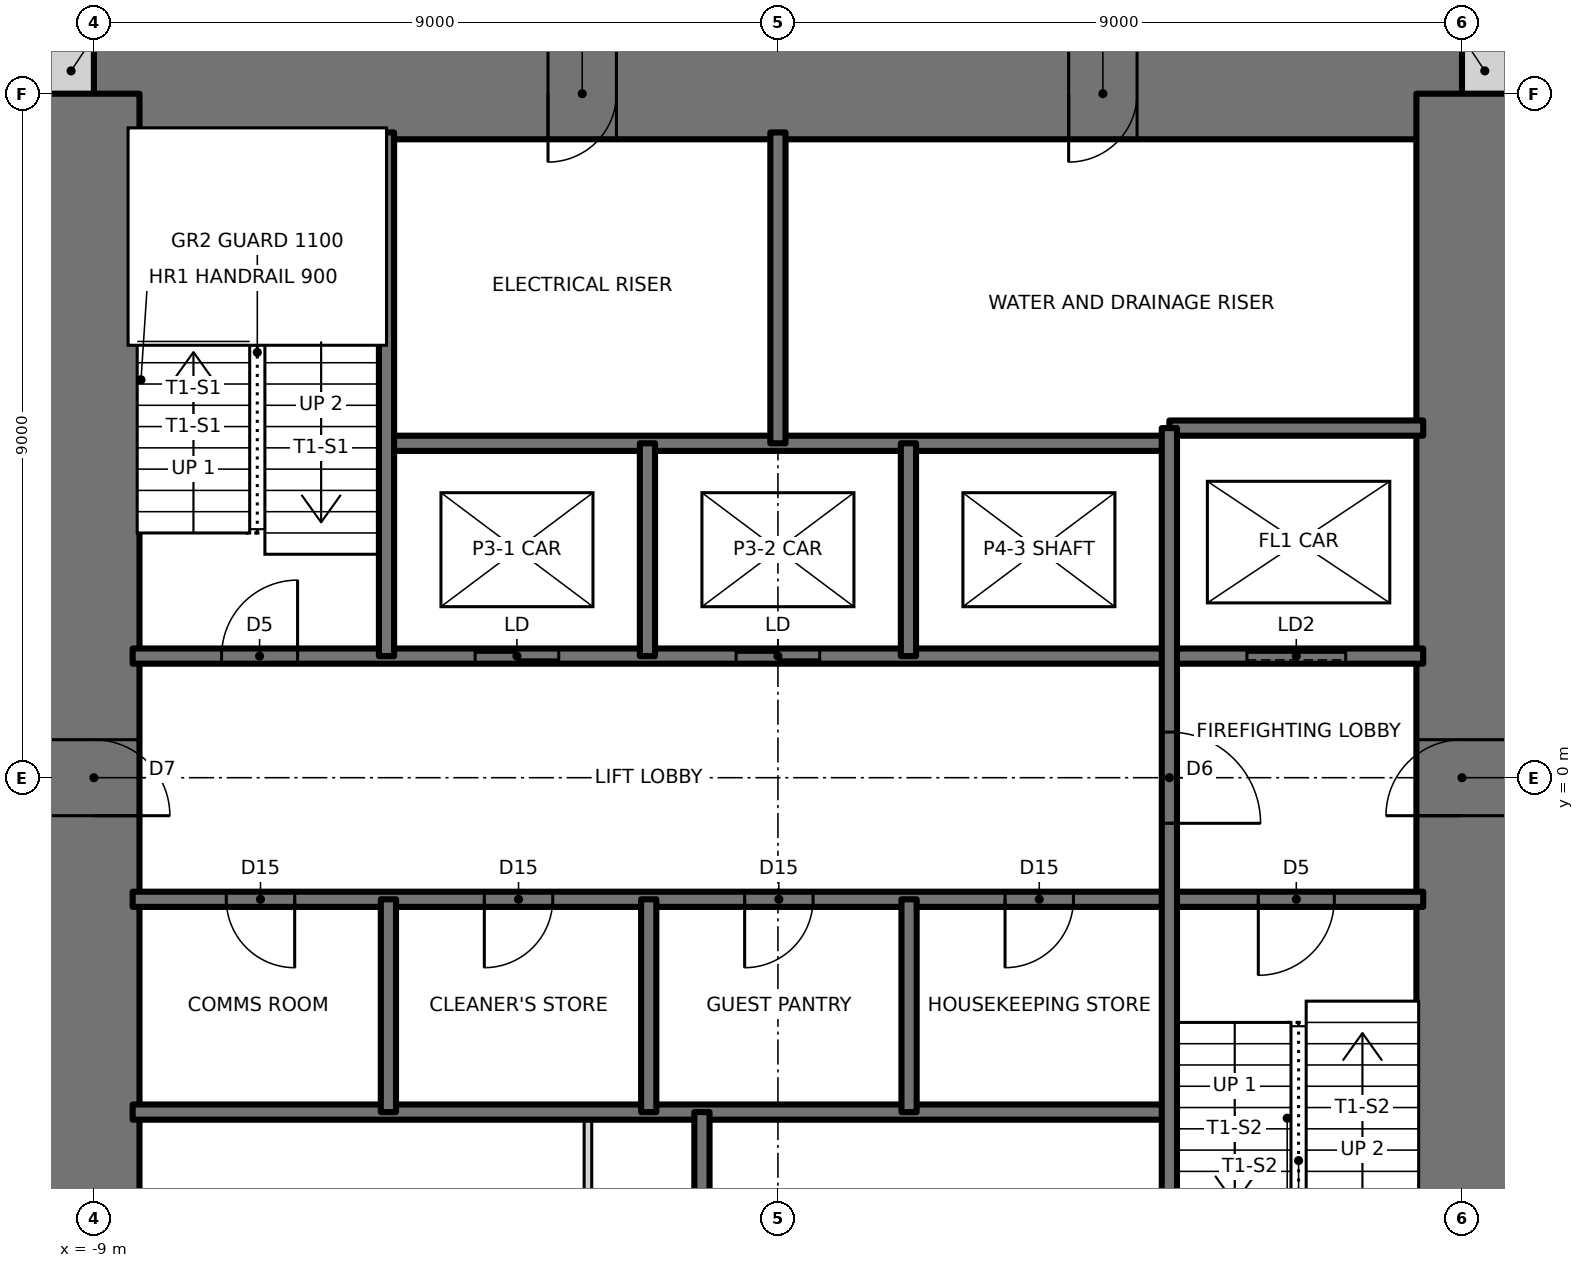
"""IFC4 building model, lengths in metres.
Left out: names, types, materials, properties, quantities, classifications, styles, units other than length and angle.
Written with IfcOpenShell. Run it as: python <this file> out.ifc"""

import sys

from ifc_helpers import new_model, si_unit, direction, frame, frame_2d, origin, place, context, subcontext, project, spatial, rectangle, extrude, element, fill, save


model = new_model("IFC4")
c1 = context("Model", 3, precision=1e-05, world=origin(), true_north=direction((0.0, 1.0)))
c2 = subcontext(c1, "Body", "Model", "MODEL_VIEW")
j1 = project(units=[si_unit("LENGTHUNIT", "METRE"), si_unit("PLANEANGLEUNIT", "RADIAN")], contexts=[c1])
p1 = place(None, origin())
s1 = spatial("IfcSite", under=j1, at=p1, CompositionType="ELEMENT")
p2 = place(p1, origin())
s2 = spatial("IfcBuilding", under=s1, at=p2, CompositionType="ELEMENT")
p3 = place(p2, frame((0.0, 0.0, 198.5)))
s3 = spatial("IfcBuildingStorey", under=s2, at=p3, CompositionType="ELEMENT", Elevation=198.5)
for number, where, z_axis, x_axis in (
    (1, (9.0, 9.3, 0.0), (0.0, 0.0, 1.0), (1.0, 0.0, 0.0)),
    (2, (-9.6, 9.3, 0.0), (0.0, 0.0, 1.0), (1.0, 0.0, 0.0)),
):
    element("IfcWall", number, at=place(p3, frame(where, z_axis=z_axis, x_axis=x_axis)), inside=s3, PredefinedType="SOLIDWALL", context=c2, shape_type="SweptSolid", body=[
        extrude(rectangle(XDim=0.6, YDim=0.6, at=frame_2d((0.3, 0.0))), origin(), (0.0, 0.0, 1.0), 3.5),
    ])
p4 = place(p3, frame((9.0, 9.0, 0.0), z_axis=(0.0, 0.0, 1.0), x_axis=(-1.0, 0.0, 0.0)))
e3 = element("IfcWall", 3, at=p4, inside=s3, PredefinedType="SHEAR", context=c2, shape_type="SweptSolid", body=[
    extrude(rectangle(XDim=18.0, YDim=1.2, at=frame_2d((9.0, 0.0))), origin(), (0.0, 0.0, 1.0), 3.5),
])
p5 = place(p4, frame((11.125, 0.0, 0.0)))
e4 = element("IfcOpeningElement", 4, at=p5, cuts=e3, PredefinedType="OPENING", context=c2, shape_type="SweptSolid", body=[
    extrude(rectangle(XDim=0.9, YDim=2.1, at=frame_2d((0.45, 1.05))), frame((0.0, 0.61, 0.0), z_axis=(0.0, -1.0, 0.0), x_axis=(1.0, 0.0, 0.0)), (0.0, 0.0, 1.0), 1.22),
])
p6 = place(p4, frame((4.275, 0.0, 0.0)))
e5 = element("IfcOpeningElement", 5, at=p6, cuts=e3, PredefinedType="OPENING", context=c2, shape_type="SweptSolid", body=[
    extrude(rectangle(XDim=0.9, YDim=2.1, at=frame_2d((0.45, 1.05))), frame((0.0, 0.61, 0.0), z_axis=(0.0, -1.0, 0.0), x_axis=(1.0, 0.0, 0.0)), (0.0, 0.0, 1.0), 1.22),
])
p7 = place(p3, frame((9.0, -9.0, 0.0), z_axis=(0.0, 0.0, 1.0), x_axis=(0.0, 1.0, 0.0)))
e6 = element("IfcWall", 6, at=p7, inside=s3, PredefinedType="SHEAR", context=c2, shape_type="SweptSolid", body=[
    extrude(rectangle(XDim=18.0, YDim=1.2, at=frame_2d((9.0, 0.0))), origin(), (0.0, 0.0, 1.0), 3.5),
])
p8 = place(p7, frame((8.5, 0.0, 0.0)))
e7 = element("IfcOpeningElement", 7, at=p8, cuts=e6, PredefinedType="OPENING", context=c2, shape_type="SweptSolid", body=[
    extrude(rectangle(XDim=1.0, YDim=2.1, at=frame_2d((0.5, 1.05))), frame((0.0, 0.61, 0.0), z_axis=(0.0, -1.0, 0.0), x_axis=(1.0, 0.0, 0.0)), (0.0, 0.0, 1.0), 1.22),
])
p9 = place(p3, frame((-9.0, 9.0, 0.0), z_axis=(0.0, 0.0, 1.0), x_axis=(0.0, -1.0, 0.0)))
e8 = element("IfcWall", 8, at=p9, inside=s3, PredefinedType="SHEAR", context=c2, shape_type="SweptSolid", body=[
    extrude(rectangle(XDim=18.0, YDim=1.2, at=frame_2d((9.0, 0.0))), origin(), (0.0, 0.0, 1.0), 3.5),
])
p10 = place(p9, frame((8.5, 0.0, 0.0)))
e9 = element("IfcOpeningElement", 9, at=p10, cuts=e8, PredefinedType="OPENING", context=c2, shape_type="SweptSolid", body=[
    extrude(rectangle(XDim=1.0, YDim=2.1, at=frame_2d((0.5, 1.05))), frame((0.0, 0.61, 0.0), z_axis=(0.0, -1.0, 0.0), x_axis=(1.0, 0.0, 0.0)), (0.0, 0.0, 1.0), 1.22),
])
p11 = place(p3, frame((-8.49, -4.4, 0.0), z_axis=(0.0, 0.0, 1.0), x_axis=(1.0, 0.0, 0.0)))
e10 = element("IfcWall", 10, at=p11, inside=s3, PredefinedType="SOLIDWALL", context=c2, shape_type="SweptSolid", body=[
    extrude(rectangle(XDim=13.64, YDim=0.2, at=frame_2d((6.82, 0.0))), origin(), (0.0, 0.0, 1.0), 3.5),
])
p12 = place(p3, frame((-8.49, -1.6, 0.0), z_axis=(0.0, 0.0, 1.0), x_axis=(1.0, 0.0, 0.0)))
e11 = element("IfcWall", 11, at=p12, inside=s3, PredefinedType="SOLIDWALL", context=c2, shape_type="SweptSolid", body=[
    extrude(rectangle(XDim=16.98, YDim=0.2, at=frame_2d((8.49, 0.0))), origin(), (0.0, 0.0, 1.0), 3.5),
])
p13 = place(p12, frame((14.81, 0.0, 0.0)))
e12 = element("IfcOpeningElement", 12, at=p13, cuts=e11, PredefinedType="OPENING", context=c2, shape_type="SweptSolid", body=[
    extrude(rectangle(XDim=1.0, YDim=2.1, at=frame_2d((0.5, 1.05))), frame((0.0, 0.11, 0.0), z_axis=(0.0, -1.0, 0.0), x_axis=(1.0, 0.0, 0.0)), (0.0, 0.0, 1.0), 0.22),
])
p14 = place(p12, frame((1.232, 0.0, 0.0)))
e13 = element("IfcOpeningElement", 13, at=p14, cuts=e11, PredefinedType="OPENING", context=c2, shape_type="SweptSolid", body=[
    extrude(rectangle(XDim=0.9, YDim=2.1, at=frame_2d((0.45, 1.05))), frame((0.0, 0.11, 0.0), z_axis=(0.0, -1.0, 0.0), x_axis=(1.0, 0.0, 0.0)), (0.0, 0.0, 1.0), 0.22),
])
p15 = place(p12, frame((4.627, 0.0, 0.0)))
e14 = element("IfcOpeningElement", 14, at=p15, cuts=e11, PredefinedType="OPENING", context=c2, shape_type="SweptSolid", body=[
    extrude(rectangle(XDim=0.9, YDim=2.1, at=frame_2d((0.45, 1.05))), frame((0.0, 0.11, 0.0), z_axis=(0.0, -1.0, 0.0), x_axis=(1.0, 0.0, 0.0)), (0.0, 0.0, 1.0), 0.22),
])
p16 = place(p12, frame((8.052, 0.0, 0.0)))
e15 = element("IfcOpeningElement", 15, at=p16, cuts=e11, PredefinedType="OPENING", context=c2, shape_type="SweptSolid", body=[
    extrude(rectangle(XDim=0.9, YDim=2.1, at=frame_2d((0.45, 1.05))), frame((0.0, 0.11, 0.0), z_axis=(0.0, -1.0, 0.0), x_axis=(1.0, 0.0, 0.0)), (0.0, 0.0, 1.0), 0.22),
])
p17 = place(p12, frame((11.478, 0.0, 0.0)))
e16 = element("IfcOpeningElement", 16, at=p17, cuts=e11, PredefinedType="OPENING", context=c2, shape_type="SweptSolid", body=[
    extrude(rectangle(XDim=0.9, YDim=2.1, at=frame_2d((0.45, 1.05))), frame((0.0, 0.11, 0.0), z_axis=(0.0, -1.0, 0.0), x_axis=(1.0, 0.0, 0.0)), (0.0, 0.0, 1.0), 0.22),
])
p18 = place(p3, frame((-8.49, 1.6, 0.0), z_axis=(0.0, 0.0, 1.0), x_axis=(1.0, 0.0, 0.0)))
e17 = element("IfcWall", 17, at=p18, inside=s3, PredefinedType="SOLIDWALL", context=c2, shape_type="SweptSolid", body=[
    extrude(rectangle(XDim=16.98, YDim=0.2, at=frame_2d((8.49, 0.0))), origin(), (0.0, 0.0, 1.0), 3.5),
])
p19 = place(p18, frame((1.17, 0.0, 0.0)))
e18 = element("IfcOpeningElement", 18, at=p19, cuts=e17, PredefinedType="OPENING", context=c2, shape_type="SweptSolid", body=[
    extrude(rectangle(XDim=1.0, YDim=2.1, at=frame_2d((0.5, 1.05))), frame((0.0, 0.11, 0.0), z_axis=(0.0, -1.0, 0.0), x_axis=(1.0, 0.0, 0.0)), (0.0, 0.0, 1.0), 0.22),
])
p20 = place(p18, frame((4.506, 0.0, 0.0)))
e19 = element("IfcOpeningElement", 19, at=p20, cuts=e17, PredefinedType="OPENING", context=c2, shape_type="SweptSolid", body=[
    extrude(rectangle(XDim=1.1, YDim=2.1, at=frame_2d((0.55, 1.05))), frame((0.0, 0.11, 0.0), z_axis=(0.0, -1.0, 0.0), x_axis=(1.0, 0.0, 0.0)), (0.0, 0.0, 1.0), 0.22),
])
p21 = place(p18, frame((7.94, 0.0, 0.0)))
e20 = element("IfcOpeningElement", 20, at=p21, cuts=e17, PredefinedType="OPENING", context=c2, shape_type="SweptSolid", body=[
    extrude(rectangle(XDim=1.1, YDim=2.1, at=frame_2d((0.55, 1.05))), frame((0.0, 0.11, 0.0), z_axis=(0.0, -1.0, 0.0), x_axis=(1.0, 0.0, 0.0)), (0.0, 0.0, 1.0), 0.22),
])
p22 = place(p18, frame((14.66, 0.0, 0.0)))
e21 = element("IfcOpeningElement", 21, at=p22, cuts=e17, PredefinedType="OPENING", context=c2, shape_type="SweptSolid", body=[
    extrude(rectangle(XDim=1.3, YDim=2.1, at=frame_2d((0.65, 1.05))), frame((0.0, 0.11, 0.0), z_axis=(0.0, -1.0, 0.0), x_axis=(1.0, 0.0, 0.0)), (0.0, 0.0, 1.0), 0.22),
])
p23 = place(p3, frame((-5.15, 4.4, 0.0), z_axis=(0.0, 0.0, 1.0), x_axis=(1.0, 0.0, 0.0)))
e22 = element("IfcWall", 22, at=p23, inside=s3, PredefinedType="SOLIDWALL", context=c2, shape_type="SweptSolid", body=[
    extrude(rectangle(XDim=10.3, YDim=0.2, at=frame_2d((5.15, 0.0))), origin(), (0.0, 0.0, 1.0), 3.5),
])
p24 = place(p3, frame((5.15, 4.6, 0.0), z_axis=(0.0, 0.0, 1.0), x_axis=(1.0, 0.0, 0.0)))
e23 = element("IfcWall", 23, at=p24, inside=s3, PredefinedType="SOLIDWALL", context=c2, shape_type="SweptSolid", body=[
    extrude(rectangle(XDim=3.34, YDim=0.2, at=frame_2d((1.67, 0.0))), origin(), (0.0, 0.0, 1.0), 3.5),
])
p25 = place(p3, frame((5.15, -8.49, 0.0), z_axis=(0.0, 0.0, 1.0), x_axis=(0.0, 1.0, 0.0)))
e24 = element("IfcWall", 24, at=p25, inside=s3, PredefinedType="SOLIDWALL", context=c2, shape_type="SweptSolid", body=[
    extrude(rectangle(XDim=13.09, YDim=0.2, at=frame_2d((6.545, 0.0))), origin(), (0.0, 0.0, 1.0), 3.5),
])
p26 = place(p25, frame((7.89, 0.0, 0.0)))
e25 = element("IfcOpeningElement", 25, at=p26, cuts=e24, PredefinedType="OPENING", context=c2, shape_type="SweptSolid", body=[
    extrude(rectangle(XDim=1.2, YDim=2.1, at=frame_2d((0.6, 1.05))), frame((0.0, 0.11, 0.0), z_axis=(0.0, -1.0, 0.0), x_axis=(1.0, 0.0, 0.0)), (0.0, 0.0, 1.0), 0.22),
])
for number, where, z_axis, x_axis in (
    (26, (1.725, -4.4, 0.0), (0.0, 0.0, 1.0), (0.0, 1.0, 0.0)),
    (27, (1.717, 1.6, 0.0), (0.0, 0.0, 1.0), (0.0, 1.0, 0.0)),
):
    element("IfcWall", number, at=place(p3, frame(where, z_axis=z_axis, x_axis=x_axis)), inside=s3, PredefinedType="SOLIDWALL", context=c2, shape_type="SweptSolid", body=[
        extrude(rectangle(XDim=2.8, YDim=0.2, at=frame_2d((1.4, 0.0))), origin(), (0.0, 0.0, 1.0), 3.5),
    ])
for number, where, z_axis, x_axis in (
    (28, (0.0, 4.4, 0.0), (0.0, 0.0, 1.0), (0.0, 1.0, 0.0)),
    (29, (-1.0, -8.49, 0.0), (0.0, 0.0, 1.0), (0.0, 1.0, 0.0)),
):
    element("IfcWall", number, at=place(p3, frame(where, z_axis=z_axis, x_axis=x_axis)), inside=s3, PredefinedType="SOLIDWALL", context=c2, shape_type="SweptSolid", body=[
        extrude(rectangle(XDim=4.09, YDim=0.2, at=frame_2d((2.045, 0.0))), origin(), (0.0, 0.0, 1.0), 3.5),
    ])
for number, where, z_axis, x_axis in (
    (30, (-1.7, -4.4, 0.0), (0.0, 0.0, 1.0), (0.0, 1.0, 0.0)),
    (31, (-1.717, 1.6, 0.0), (0.0, 0.0, 1.0), (0.0, 1.0, 0.0)),
):
    element("IfcWall", number, at=place(p3, frame(where, z_axis=z_axis, x_axis=x_axis)), inside=s3, PredefinedType="SOLIDWALL", context=c2, shape_type="SweptSolid", body=[
        extrude(rectangle(XDim=2.8, YDim=0.2, at=frame_2d((1.4, 0.0))), origin(), (0.0, 0.0, 1.0), 3.5),
    ])
p27 = place(p3, frame((-2.5, -8.49, 0.0), z_axis=(0.0, 0.0, 1.0), x_axis=(0.0, 1.0, 0.0)))
e32 = element("IfcWall", 32, at=p27, inside=s3, PredefinedType="PARTITIONING", context=c2, shape_type="SweptSolid", body=[
    extrude(rectangle(XDim=4.09, YDim=0.1, at=frame_2d((2.045, 0.0))), origin(), (0.0, 0.0, 1.0), 3.3),
])
p28 = place(p27, frame((1.595, 0.0, 0.0)))
e33 = element("IfcOpeningElement", 33, at=p28, cuts=e32, PredefinedType="OPENING", context=c2, shape_type="SweptSolid", body=[
    extrude(rectangle(XDim=0.9, YDim=2.1, at=frame_2d((0.45, 1.05))), frame((0.0, 0.06, 0.0), z_axis=(0.0, -1.0, 0.0), x_axis=(1.0, 0.0, 0.0)), (0.0, 0.0, 1.0), 0.12),
])
p29 = place(p3, frame((-5.125, -4.4, 0.0), z_axis=(0.0, 0.0, 1.0), x_axis=(0.0, 1.0, 0.0)))
e34 = element("IfcWall", 34, at=p29, inside=s3, PredefinedType="SOLIDWALL", context=c2, shape_type="SweptSolid", body=[
    extrude(rectangle(XDim=2.8, YDim=0.2, at=frame_2d((1.4, 0.0))), origin(), (0.0, 0.0, 1.0), 3.5),
])
p30 = place(p3, frame((-5.15, 1.6, 0.0), z_axis=(0.0, 0.0, 1.0), x_axis=(0.0, 1.0, 0.0)))
e35 = element("IfcWall", 35, at=p30, inside=s3, PredefinedType="SOLIDWALL", context=c2, shape_type="SweptSolid", body=[
    extrude(rectangle(XDim=6.89, YDim=0.2, at=frame_2d((3.445, 0.0))), origin(), (0.0, 0.0, 1.0), 3.5),
])
p31 = place(p19, origin())
e36 = element("IfcDoor", 36, at=p31, inside=s3, OperationType="SINGLE_SWING_RIGHT", PredefinedType="DOOR", context=c2, shape_type="SweptSolid", body=[
    extrude(rectangle(XDim=1.0, YDim=2.1, at=frame_2d((0.5, 1.05))), frame((0.0, 0.025, 0.0), z_axis=(0.0, -1.0, 0.0), x_axis=(1.0, 0.0, 0.0)), (0.0, 0.0, 1.0), 0.05),
])
fill(e18, e36)
p32 = place(p13, frame((1.0, 0.0, 0.0), z_axis=(0.0, 0.0, 1.0), x_axis=(-1.0, 0.0, 0.0)))
e37 = element("IfcDoor", 37, at=p32, inside=s3, OperationType="SINGLE_SWING_RIGHT", PredefinedType="DOOR", context=c2, shape_type="SweptSolid", body=[
    extrude(rectangle(XDim=1.0, YDim=2.1, at=frame_2d((0.5, 1.05))), frame((0.0, 0.025, 0.0), z_axis=(0.0, -1.0, 0.0), x_axis=(1.0, 0.0, 0.0)), (0.0, 0.0, 1.0), 0.05),
])
fill(e12, e37)
p33 = place(p26, frame((1.2, 0.0, 0.0), z_axis=(0.0, 0.0, 1.0), x_axis=(-1.0, 0.0, 0.0)))
e38 = element("IfcDoor", 38, at=p33, inside=s3, OperationType="SINGLE_SWING_RIGHT", PredefinedType="DOOR", context=c2, shape_type="SweptSolid", body=[
    extrude(rectangle(XDim=1.2, YDim=2.1, at=frame_2d((0.6, 1.05))), frame((0.0, 0.025, 0.0), z_axis=(0.0, -1.0, 0.0), x_axis=(1.0, 0.0, 0.0)), (0.0, 0.0, 1.0), 0.05),
])
fill(e25, e38)
p34 = place(p14, frame((0.9, 0.0, 0.0), z_axis=(0.0, 0.0, 1.0), x_axis=(-1.0, 0.0, 0.0)))
e39 = element("IfcDoor", 39, at=p34, inside=s3, OperationType="SINGLE_SWING_LEFT", PredefinedType="DOOR", context=c2, shape_type="SweptSolid", body=[
    extrude(rectangle(XDim=0.9, YDim=2.1, at=frame_2d((0.45, 1.05))), frame((0.0, 0.025, 0.0), z_axis=(0.0, -1.0, 0.0), x_axis=(1.0, 0.0, 0.0)), (0.0, 0.0, 1.0), 0.05),
])
fill(e13, e39)
p35 = place(p15, frame((0.9, 0.0, 0.0), z_axis=(0.0, 0.0, 1.0), x_axis=(-1.0, 0.0, 0.0)))
e40 = element("IfcDoor", 40, at=p35, inside=s3, OperationType="SINGLE_SWING_RIGHT", PredefinedType="DOOR", context=c2, shape_type="SweptSolid", body=[
    extrude(rectangle(XDim=0.9, YDim=2.1, at=frame_2d((0.45, 1.05))), frame((0.0, 0.025, 0.0), z_axis=(0.0, -1.0, 0.0), x_axis=(1.0, 0.0, 0.0)), (0.0, 0.0, 1.0), 0.05),
])
fill(e14, e40)
p36 = place(p16, frame((0.9, 0.0, 0.0), z_axis=(0.0, 0.0, 1.0), x_axis=(-1.0, 0.0, 0.0)))
e41 = element("IfcDoor", 41, at=p36, inside=s3, OperationType="SINGLE_SWING_RIGHT", PredefinedType="DOOR", context=c2, shape_type="SweptSolid", body=[
    extrude(rectangle(XDim=0.9, YDim=2.1, at=frame_2d((0.45, 1.05))), frame((0.0, 0.025, 0.0), z_axis=(0.0, -1.0, 0.0), x_axis=(1.0, 0.0, 0.0)), (0.0, 0.0, 1.0), 0.05),
])
fill(e15, e41)
p37 = place(p17, frame((0.9, 0.0, 0.0), z_axis=(0.0, 0.0, 1.0), x_axis=(-1.0, 0.0, 0.0)))
e42 = element("IfcDoor", 42, at=p37, inside=s3, OperationType="SINGLE_SWING_RIGHT", PredefinedType="DOOR", context=c2, shape_type="SweptSolid", body=[
    extrude(rectangle(XDim=0.9, YDim=2.1, at=frame_2d((0.45, 1.05))), frame((0.0, 0.025, 0.0), z_axis=(0.0, -1.0, 0.0), x_axis=(1.0, 0.0, 0.0)), (0.0, 0.0, 1.0), 0.05),
])
fill(e16, e42)
p38 = place(p10, origin())
e43 = element("IfcDoor", 43, at=p38, inside=s3, OperationType="SINGLE_SWING_RIGHT", PredefinedType="DOOR", context=c2, shape_type="SweptSolid", body=[
    extrude(rectangle(XDim=1.0, YDim=2.1, at=frame_2d((0.5, 1.05))), frame((0.0, 0.025, 0.0), z_axis=(0.0, -1.0, 0.0), x_axis=(1.0, 0.0, 0.0)), (0.0, 0.0, 1.0), 0.05),
])
fill(e9, e43)
p39 = place(p8, origin())
e44 = element("IfcDoor", 44, at=p39, inside=s3, OperationType="SINGLE_SWING_LEFT", PredefinedType="DOOR", context=c2, shape_type="SweptSolid", body=[
    extrude(rectangle(XDim=1.0, YDim=2.1, at=frame_2d((0.5, 1.05))), frame((0.0, 0.025, 0.0), z_axis=(0.0, -1.0, 0.0), x_axis=(1.0, 0.0, 0.0)), (0.0, 0.0, 1.0), 0.05),
])
fill(e7, e44)
p40 = place(p5, origin())
e45 = element("IfcDoor", 45, at=p40, inside=s3, OperationType="SINGLE_SWING_RIGHT", PredefinedType="DOOR", context=c2, shape_type="SweptSolid", body=[
    extrude(rectangle(XDim=0.9, YDim=2.1, at=frame_2d((0.45, 1.05))), frame((0.0, 0.025, 0.0), z_axis=(0.0, -1.0, 0.0), x_axis=(1.0, 0.0, 0.0)), (0.0, 0.0, 1.0), 0.05),
])
fill(e4, e45)
p41 = place(p6, origin())
e46 = element("IfcDoor", 46, at=p41, inside=s3, OperationType="SINGLE_SWING_RIGHT", PredefinedType="DOOR", context=c2, shape_type="SweptSolid", body=[
    extrude(rectangle(XDim=0.9, YDim=2.1, at=frame_2d((0.45, 1.05))), frame((0.0, 0.025, 0.0), z_axis=(0.0, -1.0, 0.0), x_axis=(1.0, 0.0, 0.0)), (0.0, 0.0, 1.0), 0.05),
])
fill(e5, e46)
p42 = place(p20, origin())
e47 = element("IfcDoor", 47, at=p42, inside=s3, OperationType="DOUBLE_DOOR_SLIDING", PredefinedType="DOOR", context=c2, shape_type="SweptSolid", body=[
    extrude(rectangle(XDim=1.1, YDim=2.1, at=frame_2d((0.55, 1.05))), frame((0.0, 0.025, 0.0), z_axis=(0.0, -1.0, 0.0), x_axis=(1.0, 0.0, 0.0)), (0.0, 0.0, 1.0), 0.05),
])
fill(e19, e47)
p43 = place(p21, origin())
e48 = element("IfcDoor", 48, at=p43, inside=s3, OperationType="DOUBLE_DOOR_SLIDING", PredefinedType="DOOR", context=c2, shape_type="SweptSolid", body=[
    extrude(rectangle(XDim=1.1, YDim=2.1, at=frame_2d((0.55, 1.05))), frame((0.0, 0.025, 0.0), z_axis=(0.0, -1.0, 0.0), x_axis=(1.0, 0.0, 0.0)), (0.0, 0.0, 1.0), 0.05),
])
fill(e20, e48)
p44 = place(p22, origin())
e49 = element("IfcDoor", 49, at=p44, inside=s3, OperationType="SLIDING_TO_LEFT", PredefinedType="DOOR", context=c2, shape_type="SweptSolid", body=[
    extrude(rectangle(XDim=1.3, YDim=2.1, at=frame_2d((0.65, 1.05))), frame((0.0, 0.025, 0.0), z_axis=(0.0, -1.0, 0.0), x_axis=(1.0, 0.0, 0.0)), (0.0, 0.0, 1.0), 0.05),
])
fill(e21, e49)
save(model, sys.argv[1])
